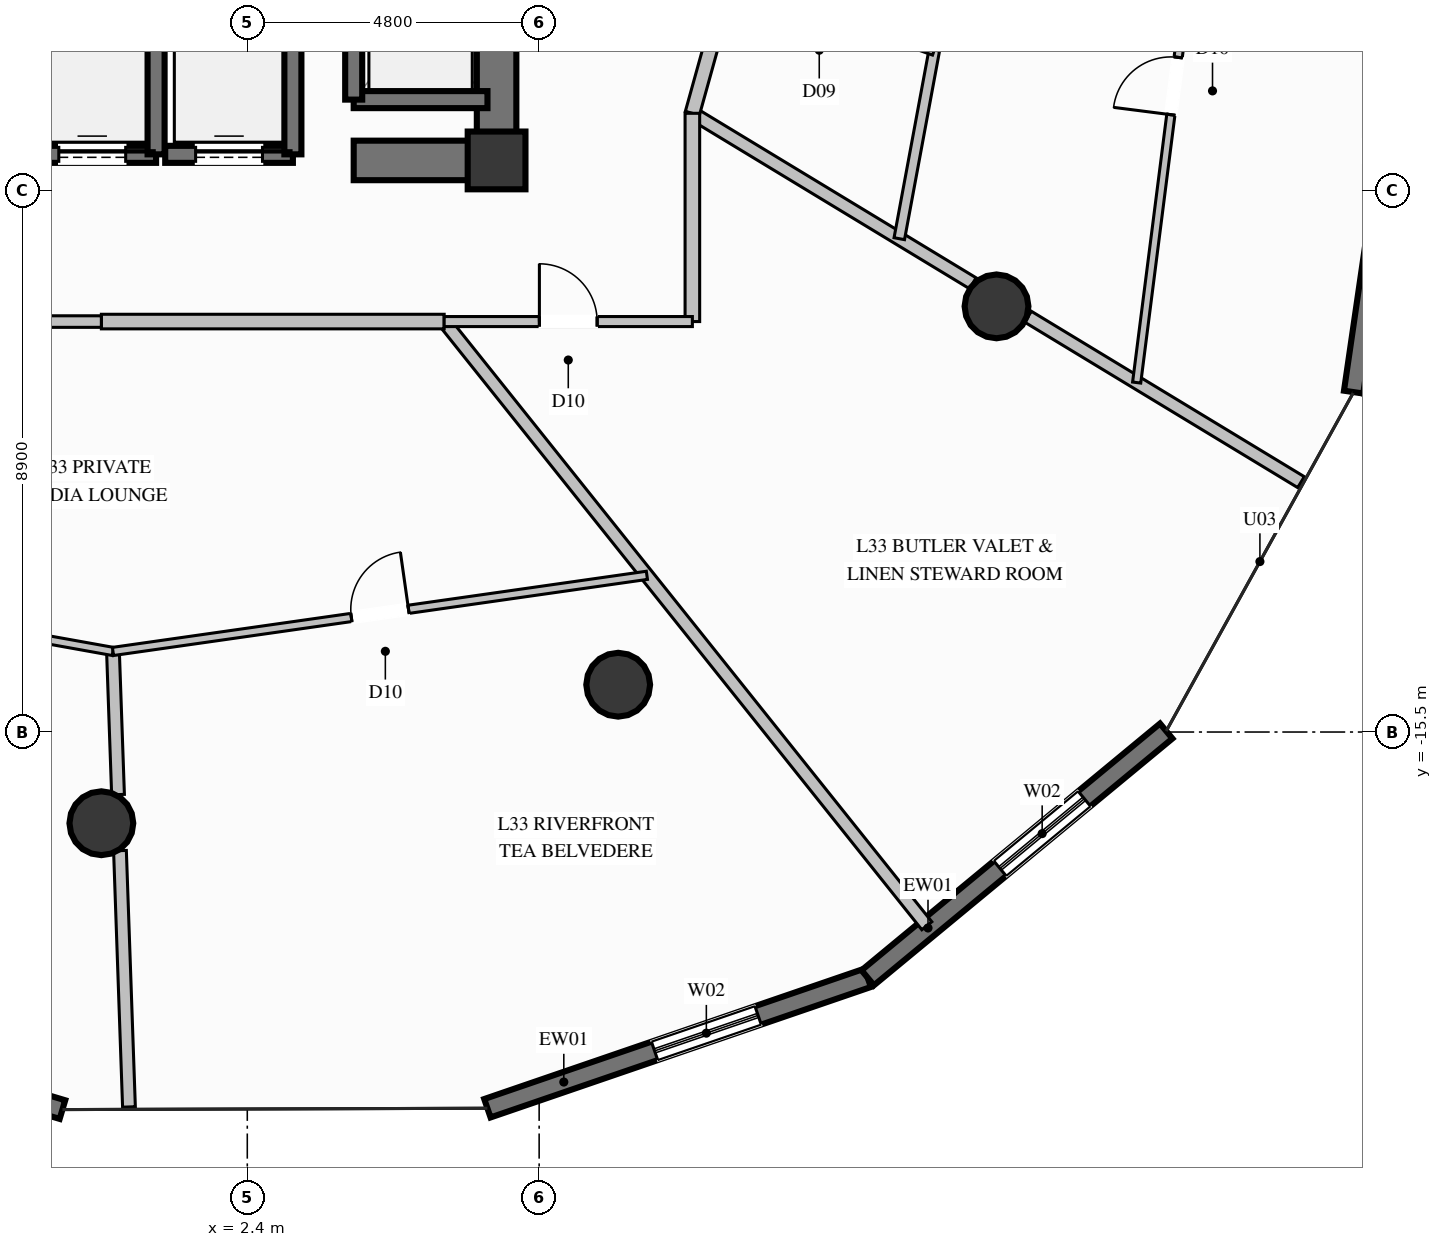
"""IFC4 building model, lengths in metres.
Left out: names, types, materials, properties, quantities, classifications, styles, units other than length and angle.
Written with IfcOpenShell. Run it as: python <this file> out.ifc"""

import sys

from ifc_helpers import new_model, si_unit, direction, frame, frame_2d, origin, origin_2d, place, context, subcontext, project, spatial, rectangle, circle, extrude, element, fill, save


model = new_model("IFC4")
c1 = context("Model", 3, precision=1e-05, world=origin(), true_north=direction((0.0, 1.0)))
c2 = subcontext(c1, "Body", "Model", "MODEL_VIEW")
j1 = project(units=[si_unit("LENGTHUNIT", "METRE"), si_unit("PLANEANGLEUNIT", "RADIAN")], contexts=[c1])
p1 = place(None, origin())
s1 = spatial("IfcSite", under=j1, at=p1, CompositionType="ELEMENT")
p2 = place(p1, origin())
s2 = spatial("IfcBuilding", under=s1, at=p2, CompositionType="ELEMENT")
p3 = place(p2, frame((0.0, 0.0, 131.4)))
s3 = spatial("IfcBuildingStorey", under=s2, at=p3, CompositionType="ELEMENT", Elevation=131.4)
p4 = place(p3, frame((6.5, -6.1, 0.0), z_axis=(0.0, 0.0, 1.0), x_axis=(1.0, 0.0, 0.0)))
e1 = element("IfcColumn", 1, at=p4, inside=s3, PredefinedType="COLUMN", context=c2, shape_type="SweptSolid", body=[
    extrude(rectangle(XDim=0.95, YDim=0.95, at=origin_2d()), origin(), (0.0, 0.0, 1.0), 3.6),
])
p5 = place(p3, frame((4.15, -6.1, 0.0), z_axis=(0.0, 0.0, 1.0), x_axis=(1.0, 0.0, 0.0)))
e2 = element("IfcWall", 2, at=p5, inside=s3, PredefinedType="SHEAR", context=c2, shape_type="SweptSolid", body=[
    extrude(rectangle(XDim=2.025, YDim=0.65, at=frame_2d((1.013, 0.0))), origin(), (0.0, 0.0, 1.0), 3.6),
])
p6 = place(p3, frame((6.5, -6.425, 0.0), z_axis=(0.0, 0.0, 1.0), x_axis=(0.0, 1.0, 0.0)))
e3 = element("IfcWall", 3, at=p6, inside=s3, PredefinedType="SHEAR", context=c2, shape_type="SweptSolid", body=[
    extrude(rectangle(XDim=4.075, YDim=0.65, at=frame_2d((2.038, 0.0))), origin(), (0.0, 0.0, 1.0), 3.6),
])
for number, where, z_axis, x_axis in (
    (4, (0.0, -17.0, 0.0), (0.0, 0.0, 1.0), (1.0, 0.0, 0.0)),
    (5, (8.5, -14.722, 0.0), (0.0, 0.0, 1.0), (1.0, 0.0, 0.0)),
    (6, (14.722, -8.5, 0.0), (0.0, 0.0, 1.0), (1.0, 0.0, 0.0)),
):
    element("IfcColumn", number, at=place(p3, frame(where, z_axis=z_axis, x_axis=x_axis)), inside=s3, PredefinedType="COLUMN", context=c2, shape_type="SweptSolid", body=[
        extrude(circle(Radius=0.525, at=origin_2d()), origin(), (0.0, 0.0, 1.0), 3.6),
    ])
p7 = place(p3, frame((21.549, -3.366, 0.0), z_axis=(0.0, 0.0, 1.0), x_axis=(-0.144273756633, -0.989537812894, 0.0)))
e7 = element("IfcWall", 7, at=p7, inside=s3, PredefinedType="SOLIDWALL", context=c2, shape_type="SweptSolid", body=[
    extrude(rectangle(XDim=6.613, YDim=0.32, at=frame_2d((3.307, 0.0))), origin(), (0.0, 0.0, 1.0), 3.35),
])
p8 = place(p7, frame((2.407, 0.0, 0.35)))
e8 = element("IfcOpeningElement", 8, at=p8, cuts=e7, PredefinedType="OPENING", context=c2, shape_type="SweptSolid", body=[
    extrude(rectangle(XDim=1.8, YDim=2.6, at=frame_2d((0.9, 1.3))), frame((0.0, 0.17, 0.0), z_axis=(0.0, -1.0, 0.0), x_axis=(1.0, 0.0, 0.0)), (0.0, 0.0, 1.0), 0.34),
])
p9 = place(p3, frame((-0.64, -21.709, 0.0), z_axis=(0.0, 0.0, 1.0), x_axis=(-0.958187738701, 0.286140275743, 0.0)))
e9 = element("IfcWall", 9, at=p9, inside=s3, PredefinedType="SOLIDWALL", context=c2, shape_type="SweptSolid", body=[
    extrude(rectangle(XDim=7.346, YDim=0.32, at=frame_2d((3.673, 0.0))), origin(), (0.0, 0.0, 1.0), 3.35),
])
p10 = place(p9, frame((2.773, 0.0, 0.35)))
e10 = element("IfcOpeningElement", 10, at=p10, cuts=e9, PredefinedType="OPENING", context=c2, shape_type="SweptSolid", body=[
    extrude(rectangle(XDim=1.8, YDim=2.6, at=frame_2d((0.9, 1.3))), frame((0.0, 0.17, 0.0), z_axis=(0.0, -1.0, 0.0), x_axis=(1.0, 0.0, 0.0)), (0.0, 0.0, 1.0), 0.34),
])
p11 = place(p3, frame((12.604, -19.542, 0.0), z_axis=(0.0, 0.0, 1.0), x_axis=(-0.945923289235, -0.324390398877, 0.0)))
e11 = element("IfcWall", 11, at=p11, inside=s3, PredefinedType="SOLIDWALL", context=c2, shape_type="SweptSolid", body=[
    extrude(rectangle(XDim=6.613, YDim=0.32, at=frame_2d((3.306, 0.0))), origin(), (0.0, 0.0, 1.0), 3.35),
])
p12 = place(p11, frame((1.906, 0.0, 0.35)))
e12 = element("IfcOpeningElement", 12, at=p12, cuts=e11, PredefinedType="OPENING", context=c2, shape_type="SweptSolid", body=[
    extrude(rectangle(XDim=1.8, YDim=2.6, at=frame_2d((0.9, 1.3))), frame((0.0, 0.17, 0.0), z_axis=(0.0, -1.0, 0.0), x_axis=(1.0, 0.0, 0.0)), (0.0, 0.0, 1.0), 0.34),
])
p13 = place(p3, frame((17.513, -15.484, 0.0), z_axis=(0.0, 0.0, 1.0), x_axis=(-0.770738302789, -0.637151841098, 0.0)))
e13 = element("IfcWall", 13, at=p13, inside=s3, PredefinedType="SOLIDWALL", context=c2, shape_type="SweptSolid", body=[
    extrude(rectangle(XDim=6.369, YDim=0.32, at=frame_2d((3.185, 0.0))), origin(), (0.0, 0.0, 1.0), 3.35),
])
p14 = place(p13, frame((1.747, 0.0, 0.35)))
e14 = element("IfcOpeningElement", 14, at=p14, cuts=e13, PredefinedType="OPENING", context=c2, shape_type="SweptSolid", body=[
    extrude(rectangle(XDim=1.8, YDim=2.6, at=frame_2d((0.9, 1.3))), frame((0.0, 0.17, 0.0), z_axis=(0.0, -1.0, 0.0), x_axis=(1.0, 0.0, 0.0)), (0.0, 0.0, 1.0), 0.34),
])
p15 = place(p3, frame((-1.2, -6.0, 0.0), z_axis=(0.0, 0.0, 1.0), x_axis=(1.0, 0.0, 0.0)))
e15 = element("IfcWall", 15, at=p15, inside=s3, PredefinedType="SOLIDWALL", context=c2, shape_type="SweptSolid", body=[
    extrude(rectangle(XDim=2.1, YDim=0.28, at=frame_2d((1.05, 0.0))), origin(), (0.0, 0.0, 1.0), 3.35),
])
p16 = place(p15, frame((0.5, 0.0, 0.0)))
e16 = element("IfcOpeningElement", 16, at=p16, cuts=e15, PredefinedType="OPENING", context=c2, shape_type="SweptSolid", body=[
    extrude(rectangle(XDim=1.1, YDim=2.2, at=frame_2d((0.55, 1.1))), frame((0.0, 0.15, 0.0), z_axis=(0.0, -1.0, 0.0), x_axis=(1.0, 0.0, 0.0)), (0.0, 0.0, 1.0), 0.3),
])
p17 = place(p3, frame((0.9, -6.0, 0.0), z_axis=(0.0, 0.0, 1.0), x_axis=(0.0, 1.0, 0.0)))
e17 = element("IfcWall", 17, at=p17, inside=s3, PredefinedType="SOLIDWALL", context=c2, shape_type="SweptSolid", body=[
    extrude(rectangle(XDim=2.5, YDim=0.28, at=frame_2d((1.25, 0.0))), origin(), (0.0, 0.0, 1.0), 3.35),
])
p18 = place(p3, frame((1.05, -6.0, 0.0), z_axis=(0.0, 0.0, 1.0), x_axis=(1.0, 0.0, 0.0)))
e18 = element("IfcWall", 18, at=p18, inside=s3, PredefinedType="SOLIDWALL", context=c2, shape_type="SweptSolid", body=[
    extrude(rectangle(XDim=2.1, YDim=0.28, at=frame_2d((1.05, 0.0))), origin(), (0.0, 0.0, 1.0), 3.35),
])
p19 = place(p18, frame((0.5, 0.0, 0.0)))
e19 = element("IfcOpeningElement", 19, at=p19, cuts=e18, PredefinedType="OPENING", context=c2, shape_type="SweptSolid", body=[
    extrude(rectangle(XDim=1.1, YDim=2.2, at=frame_2d((0.55, 1.1))), frame((0.0, 0.15, 0.0), z_axis=(0.0, -1.0, 0.0), x_axis=(1.0, 0.0, 0.0)), (0.0, 0.0, 1.0), 0.3),
])
p20 = place(p3, frame((3.15, -6.0, 0.0), z_axis=(0.0, 0.0, 1.0), x_axis=(0.0, 1.0, 0.0)))
e20 = element("IfcWall", 20, at=p20, inside=s3, PredefinedType="SOLIDWALL", context=c2, shape_type="SweptSolid", body=[
    extrude(rectangle(XDim=2.5, YDim=0.28, at=frame_2d((1.25, 0.0))), origin(), (0.0, 0.0, 1.0), 3.35),
])
p21 = place(p3, frame((4.15, -5.1, 0.0), z_axis=(0.0, 0.0, 1.0), x_axis=(1.0, 0.0, 0.0)))
e21 = element("IfcWall", 21, at=p21, inside=s3, PredefinedType="SOLIDWALL", context=c2, shape_type="SweptSolid", body=[
    extrude(rectangle(XDim=2.2, YDim=0.28, at=frame_2d((1.1, 0.0))), origin(), (0.0, 0.0, 1.0), 3.35),
])
p22 = place(p3, frame((4.15, -2.4, 0.0), z_axis=(0.0, 0.0, 1.0), x_axis=(0.0, -1.0, 0.0)))
e22 = element("IfcWall", 22, at=p22, inside=s3, PredefinedType="SOLIDWALL", context=c2, shape_type="SweptSolid", body=[
    extrude(rectangle(XDim=2.7, YDim=0.28, at=frame_2d((1.35, 0.0))), origin(), (0.0, 0.0, 1.0), 3.35),
])
p23 = place(p3, frame((9.72, -5.325, 0.0), z_axis=(0.0, 0.0, 1.0), x_axis=(0.855199655735, -0.518298706183, 0.0)))
e23 = element("IfcWall", 23, at=p23, inside=s3, PredefinedType="PARTITIONING", context=c2, shape_type="SweptSolid", body=[
    extrude(rectangle(XDim=5.393, YDim=0.21, at=frame_2d((2.697, 0.0))), origin(), (0.0, 0.0, 1.0), 2.791),
])
p24 = place(p3, frame((15.24, -8.67, 0.0), z_axis=(0.0, 0.0, 1.0), x_axis=(0.855199080738, -0.518299654935, 0.0)))
e24 = element("IfcWall", 24, at=p24, inside=s3, PredefinedType="PARTITIONING", context=c2, shape_type="SweptSolid", body=[
    extrude(rectangle(XDim=5.25, YDim=0.21, at=frame_2d((2.625, 0.0))), origin(), (0.0, 0.0, 1.0), 3.35),
])
p25 = place(p3, frame((9.72, -5.325, 0.0), z_axis=(0.0, 0.0, 1.0), x_axis=(0.268045342481, 0.963406297662, 0.0)))
e25 = element("IfcWall", 25, at=p25, inside=s3, PredefinedType="PARTITIONING", context=c2, shape_type="SweptSolid", body=[
    extrude(rectangle(XDim=2.321, YDim=0.24, at=frame_2d((1.16, 0.0))), origin(), (0.0, 0.0, 1.0), 3.35),
])
p26 = place(p3, frame((13.123, -7.387, 0.0), z_axis=(0.0, 0.0, 1.0), x_axis=(0.182540901641, 0.983198260387, 0.0)))
e26 = element("IfcWall", 26, at=p26, inside=s3, PredefinedType="PLUMBINGWALL", context=c2, shape_type="SweptSolid", body=[
    extrude(rectangle(XDim=3.155, YDim=0.175, at=frame_2d((1.578, 0.0))), origin(), (0.0, 0.0, 1.0), 3.35),
])
p27 = place(p3, frame((10.342, -3.089, 0.0), z_axis=(0.0, 0.0, 1.0), x_axis=(0.942017496202, -0.335563759738, 0.0)))
e27 = element("IfcWall", 27, at=p27, inside=s3, PredefinedType="PLUMBINGWALL", context=c2, shape_type="SweptSolid", body=[
    extrude(rectangle(XDim=3.563, YDim=0.175, at=frame_2d((1.782, 0.0))), origin(), (0.0, 0.0, 1.0), 3.35),
])
p28 = place(p27, frame((1.332, 0.0, 0.0)))
e28 = element("IfcOpeningElement", 28, at=p28, cuts=e27, PredefinedType="OPENING", context=c2, shape_type="SweptSolid", body=[
    extrude(rectangle(XDim=0.9, YDim=2.1, at=frame_2d((0.45, 1.05))), frame((0.0, 0.098, 0.0), z_axis=(0.0, -1.0, 0.0), x_axis=(1.0, 0.0, 0.0)), (0.0, 0.0, 1.0), 0.195),
])
p29 = place(p3, frame((17.027, -9.753, 0.0), z_axis=(0.0, 0.0, 1.0), x_axis=(0.126613692023, 0.991952102166, 0.0)))
e29 = element("IfcWall", 29, at=p29, inside=s3, PredefinedType="PARTITIONING", context=c2, shape_type="SweptSolid", body=[
    extrude(rectangle(XDim=9.832, YDim=0.135, at=frame_2d((4.916, 0.0))), origin(), (0.0, 0.0, 1.0), 3.35),
])
p30 = place(p29, frame((4.441, 0.0, 0.0)))
e30 = element("IfcOpeningElement", 30, at=p30, cuts=e29, PredefinedType="OPENING", context=c2, shape_type="SweptSolid", body=[
    extrude(rectangle(XDim=0.95, YDim=2.1, at=frame_2d((0.475, 1.05))), frame((0.0, 0.078, 0.0), z_axis=(0.0, -1.0, 0.0), x_axis=(1.0, 0.0, 0.0)), (0.0, 0.0, 1.0), 0.155),
])
p31 = place(p3, frame((5.638, -8.75, 0.0), z_axis=(0.0, 0.0, 1.0), x_axis=(0.624175182261, -0.781284418025, 0.0)))
e31 = element("IfcWall", 31, at=p31, inside=s3, PredefinedType="PARTITIONING", context=c2, shape_type="SweptSolid", body=[
    extrude(rectangle(XDim=12.718, YDim=0.21, at=frame_2d((6.359, 0.0))), origin(), (0.0, 0.0, 1.0), 3.35),
])
p32 = place(p3, frame((0.0, -8.75, 0.0), z_axis=(0.0, 0.0, 1.0), x_axis=(1.0, 0.0, 0.0)))
e32 = element("IfcWall", 32, at=p32, inside=s3, PredefinedType="PARTITIONING", context=c2, shape_type="SweptSolid", body=[
    extrude(rectangle(XDim=5.638, YDim=0.24, at=frame_2d((2.819, 0.0))), origin(), (0.0, 0.0, 1.0), 3.35),
])
p33 = place(p3, frame((-9.42, -8.75, 0.0), z_axis=(0.0, 0.0, 1.0), x_axis=(1.0, 0.0, 0.0)))
e33 = element("IfcWall", 33, at=p33, inside=s3, PredefinedType="PARTITIONING", context=c2, shape_type="SweptSolid", body=[
    extrude(rectangle(XDim=9.42, YDim=0.19, at=frame_2d((4.71, 0.0))), origin(), (0.0, 0.0, 1.0), 3.35),
])
p34 = place(p33, frame((4.235, 0.0, 0.0)))
e34 = element("IfcOpeningElement", 34, at=p34, cuts=e33, PredefinedType="OPENING", context=c2, shape_type="SweptSolid", body=[
    extrude(rectangle(XDim=0.95, YDim=2.1, at=frame_2d((0.475, 1.05))), frame((0.0, 0.105, 0.0), z_axis=(0.0, -1.0, 0.0), x_axis=(1.0, 0.0, 0.0)), (0.0, 0.0, 1.0), 0.21),
])
p35 = place(p3, frame((0.191, -14.175, 0.0), z_axis=(0.0, 0.0, 1.0), x_axis=(0.035240490846, -0.999378860996, 0.0)))
e35 = element("IfcWall", 35, at=p35, inside=s3, PredefinedType="PARTITIONING", context=c2, shape_type="SweptSolid", body=[
    extrude(rectangle(XDim=2.355, YDim=0.21, at=frame_2d((1.178, 0.0))), origin(), (0.0, 0.0, 1.0), 3.35),
])
p36 = place(p3, frame((0.306, -17.451, 0.0), z_axis=(0.0, 0.0, 1.0), x_axis=(0.035136125061, -0.999382535727, 0.0)))
e36 = element("IfcWall", 36, at=p36, inside=s3, PredefinedType="PARTITIONING", context=c2, shape_type="SweptSolid", body=[
    extrude(rectangle(XDim=4.218, YDim=0.21, at=frame_2d((2.109, 0.0))), origin(), (0.0, 0.0, 1.0), 3.35),
])
p37 = place(p3, frame((-10.264, -12.3, 0.0), z_axis=(0.0, 0.0, 1.0), x_axis=(0.984295895502, -0.176526457218, 0.0)))
e37 = element("IfcWall", 37, at=p37, inside=s3, PredefinedType="PARTITIONING", context=c2, shape_type="SweptSolid", body=[
    extrude(rectangle(XDim=10.622, YDim=0.135, at=frame_2d((5.311, 0.0))), origin(), (0.0, 0.0, 1.0), 3.35),
])
p38 = place(p37, frame((4.836, 0.0, 0.0)))
e38 = element("IfcOpeningElement", 38, at=p38, cuts=e37, PredefinedType="OPENING", context=c2, shape_type="SweptSolid", body=[
    extrude(rectangle(XDim=0.95, YDim=2.1, at=frame_2d((0.475, 1.05))), frame((0.0, 0.078, 0.0), z_axis=(0.0, -1.0, 0.0), x_axis=(1.0, 0.0, 0.0)), (0.0, 0.0, 1.0), 0.155),
])
p39 = place(p3, frame((0.191, -14.175, 0.0), z_axis=(0.0, 0.0, 1.0), x_axis=(0.98998854123, 0.141147753202, 0.0)))
e39 = element("IfcWall", 39, at=p39, inside=s3, PredefinedType="PARTITIONING", context=c2, shape_type="SweptSolid", body=[
    extrude(rectangle(XDim=8.87, YDim=0.135, at=frame_2d((4.435, 0.0))), origin(), (0.0, 0.0, 1.0), 3.35),
])
p40 = place(p39, frame((3.96, 0.0, 0.0)))
e40 = element("IfcOpeningElement", 40, at=p40, cuts=e39, PredefinedType="OPENING", context=c2, shape_type="SweptSolid", body=[
    extrude(rectangle(XDim=0.95, YDim=2.1, at=frame_2d((0.475, 1.05))), frame((0.0, 0.078, 0.0), z_axis=(0.0, -1.0, 0.0), x_axis=(1.0, 0.0, 0.0)), (0.0, 0.0, 1.0), 0.155),
])
p41 = place(p3, frame((9.72, -8.75, 0.0), z_axis=(0.0, 0.0, 1.0), x_axis=(0.0, 1.0, 0.0)))
e41 = element("IfcWall", 41, at=p41, inside=s3, PredefinedType="PARTITIONING", context=c2, shape_type="SweptSolid", body=[
    extrude(rectangle(XDim=3.425, YDim=0.24, at=frame_2d((1.712, 0.0))), origin(), (0.0, 0.0, 1.0), 3.35),
])
p42 = place(p3, frame((5.638, -8.75, 0.0), z_axis=(0.0, 0.0, 1.0), x_axis=(1.0, 0.0, 0.0)))
e42 = element("IfcWall", 42, at=p42, inside=s3, PredefinedType="PARTITIONING", context=c2, shape_type="SweptSolid", body=[
    extrude(rectangle(XDim=4.082, YDim=0.165, at=frame_2d((2.041, 0.0))), origin(), (0.0, 0.0, 1.0), 3.35),
])
p43 = place(p42, frame((1.566, 0.0, 0.0)))
e43 = element("IfcOpeningElement", 43, at=p43, cuts=e42, PredefinedType="OPENING", context=c2, shape_type="SweptSolid", body=[
    extrude(rectangle(XDim=0.95, YDim=2.1, at=frame_2d((0.475, 1.05))), frame((0.0, 0.093, 0.0), z_axis=(0.0, -1.0, 0.0), x_axis=(1.0, 0.0, 0.0)), (0.0, 0.0, 1.0), 0.185),
])
p44 = place(p12, origin())
e44 = element("IfcWindow", 44, at=p44, inside=s3, PartitioningType="SINGLE_PANEL", PredefinedType="WINDOW", context=c2, shape_type="SweptSolid", body=[
    extrude(rectangle(XDim=1.8, YDim=2.6, at=frame_2d((0.9, 1.3))), frame((0.0, 0.03, 0.0), z_axis=(0.0, -1.0, 0.0), x_axis=(1.0, 0.0, 0.0)), (0.0, 0.0, 1.0), 0.06),
])
fill(e12, e44)
p45 = place(p14, origin())
e45 = element("IfcWindow", 45, at=p45, inside=s3, PartitioningType="SINGLE_PANEL", PredefinedType="WINDOW", context=c2, shape_type="SweptSolid", body=[
    extrude(rectangle(XDim=1.8, YDim=2.6, at=frame_2d((0.9, 1.3))), frame((0.0, 0.03, 0.0), z_axis=(0.0, -1.0, 0.0), x_axis=(1.0, 0.0, 0.0)), (0.0, 0.0, 1.0), 0.06),
])
fill(e14, e45)
p46 = place(p16, origin())
e46 = element("IfcDoor", 46, at=p46, inside=s3, OperationType="SLIDING_TO_LEFT", PredefinedType="DOOR", context=c2, shape_type="SweptSolid", body=[
    extrude(rectangle(XDim=1.1, YDim=2.2, at=frame_2d((0.55, 1.1))), frame((0.0, 0.025, 0.0), z_axis=(0.0, -1.0, 0.0), x_axis=(1.0, 0.0, 0.0)), (0.0, 0.0, 1.0), 0.05),
])
fill(e16, e46)
p47 = place(p19, origin())
e47 = element("IfcDoor", 47, at=p47, inside=s3, OperationType="SLIDING_TO_LEFT", PredefinedType="DOOR", context=c2, shape_type="SweptSolid", body=[
    extrude(rectangle(XDim=1.1, YDim=2.2, at=frame_2d((0.55, 1.1))), frame((0.0, 0.025, 0.0), z_axis=(0.0, -1.0, 0.0), x_axis=(1.0, 0.0, 0.0)), (0.0, 0.0, 1.0), 0.05),
])
fill(e19, e47)
p48 = place(p30, origin())
e48 = element("IfcDoor", 48, at=p48, inside=s3, OperationType="SINGLE_SWING_LEFT", PredefinedType="DOOR", context=c2, shape_type="SweptSolid", body=[
    extrude(rectangle(XDim=0.95, YDim=2.1, at=frame_2d((0.475, 1.05))), frame((0.0, 0.025, 0.0), z_axis=(0.0, -1.0, 0.0), x_axis=(1.0, 0.0, 0.0)), (0.0, 0.0, 1.0), 0.05),
])
fill(e30, e48)
p49 = place(p40, origin())
e49 = element("IfcDoor", 49, at=p49, inside=s3, OperationType="SINGLE_SWING_RIGHT", PredefinedType="DOOR", context=c2, shape_type="SweptSolid", body=[
    extrude(rectangle(XDim=0.95, YDim=2.1, at=frame_2d((0.475, 1.05))), frame((0.0, 0.025, 0.0), z_axis=(0.0, -1.0, 0.0), x_axis=(1.0, 0.0, 0.0)), (0.0, 0.0, 1.0), 0.05),
])
fill(e40, e49)
p50 = place(p43, origin())
e50 = element("IfcDoor", 50, at=p50, inside=s3, OperationType="SINGLE_SWING_LEFT", PredefinedType="DOOR", context=c2, shape_type="SweptSolid", body=[
    extrude(rectangle(XDim=0.95, YDim=2.1, at=frame_2d((0.475, 1.05))), frame((0.0, 0.025, 0.0), z_axis=(0.0, -1.0, 0.0), x_axis=(1.0, 0.0, 0.0)), (0.0, 0.0, 1.0), 0.05),
])
fill(e43, e50)
save(model, sys.argv[1])
